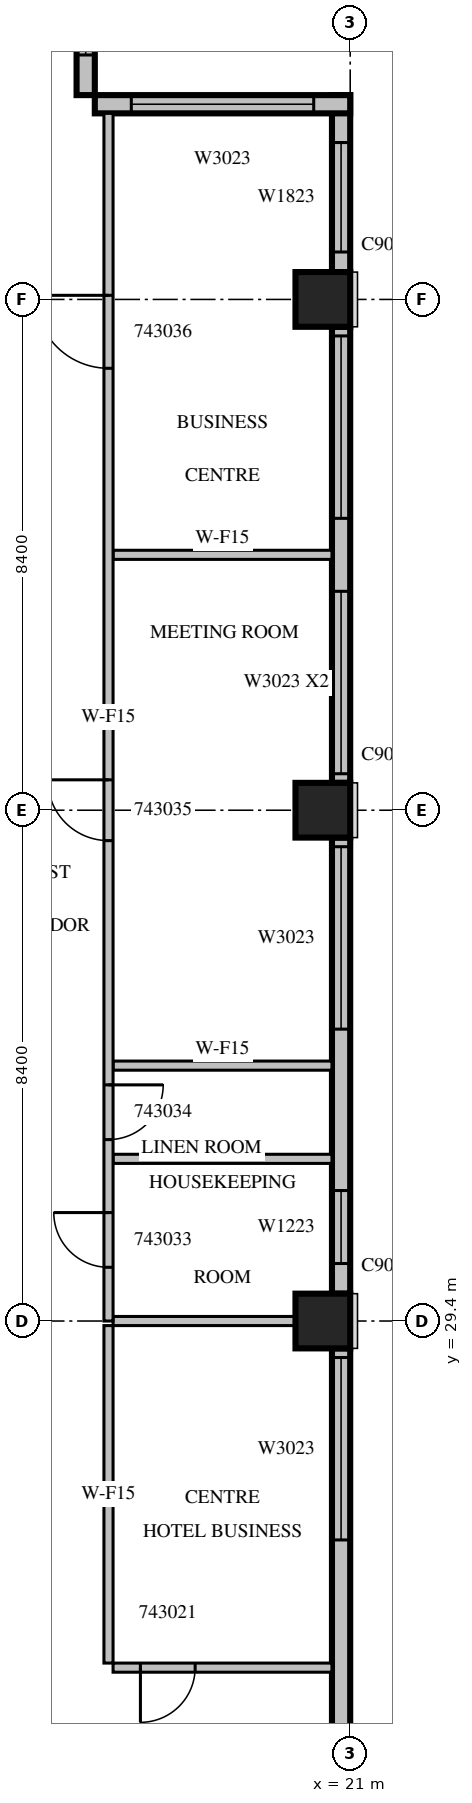
"""IFC4 building model, lengths in metres.
Left out: names, types, materials, properties, quantities, classifications, styles, units other than length and angle.
Written with IfcOpenShell. Run it as: python <this file> out.ifc"""

import sys

from ifc_helpers import new_model, si_unit, direction, frame, frame_2d, origin, origin_2d, place, context, subcontext, project, spatial, rectangle, extrude, source, transform, mapped, element, fill, save


model = new_model("IFC4")
c1 = context("Model", 3, precision=1e-05, world=origin(), true_north=direction((0.0, 1.0)))
c2 = subcontext(c1, "Body", "Model", "MODEL_VIEW")
j1 = project(units=[si_unit("LENGTHUNIT", "METRE"), si_unit("PLANEANGLEUNIT", "RADIAN")], contexts=[c1])
p1 = place(None, origin())
s1 = spatial("IfcSite", under=j1, at=p1, CompositionType="ELEMENT")
p2 = place(p1, origin())
s2 = spatial("IfcBuilding", under=s1, at=p2, CompositionType="ELEMENT")
p3 = place(p2, frame((0.0, 0.0, 196.8)))
s3 = spatial("IfcBuildingStorey", under=s2, at=p3, CompositionType="ELEMENT", Elevation=196.8)
m1 = source(origin(), c2, "Body", "SweptSolid", [
    extrude(rectangle(XDim=0.9, YDim=0.9, at=origin_2d()), origin(), (0.0, 0.0, 1.0), 3.8),
])
for number, where, z_axis, x_axis in (
    (1, (20.55, 29.4, 0.0), (0.0, 0.0, 1.0), (1.0, 0.0, 0.0)),
    (2, (20.55, 37.8, 0.0), (0.0, 0.0, 1.0), (1.0, 0.0, 0.0)),
    (3, (20.55, 46.2, 0.0), (0.0, 0.0, 1.0), (1.0, 0.0, 0.0)),
):
    element("IfcColumn", number, at=place(p3, frame(where, z_axis=z_axis, x_axis=x_axis)), inside=s3, PredefinedType="COLUMN", context=c2, shape_type="MappedRepresentation", body=[
        mapped(m1, transform((0.0, 0.0, 0.0), scale=1.0)),
    ])
m2 = source(origin(), c2, "Body", "SweptSolid", [
    extrude(rectangle(XDim=7.15, YDim=0.3, at=frame_2d((3.575, 0.0))), origin(), (0.0, 0.0, 1.0), 3.4),
])
p4 = place(p3, frame((20.85, 21.8, 0.0), z_axis=(0.0, 0.0, 1.0), x_axis=(0.0, 1.0, 0.0)))
e4 = element("IfcWall", 4, at=p4, inside=s3, PredefinedType="STANDARD", context=c2, shape_type="MappedRepresentation", body=[
    mapped(m2, transform((0.0, 0.0, 0.0), scale=1.0)),
])
m3 = source(origin(), c2, "Body", "SweptSolid", [
    extrude(rectangle(XDim=3.0, YDim=2.3, at=frame_2d((1.5, 1.15))), frame((0.0, 0.16, 0.0), z_axis=(0.0, -1.0, 0.0), x_axis=(1.0, 0.0, 0.0)), (0.0, 0.0, 1.0), 0.32),
])
p5 = place(p4, frame((4.0, 0.0, 0.6)))
e5 = element("IfcOpeningElement", 5, at=p5, cuts=e4, PredefinedType="OPENING", context=c2, shape_type="MappedRepresentation", body=[
    mapped(m3, transform((0.0, 0.0, 0.0), scale=1.0)),
])
m4 = source(origin(), c2, "Body", "SweptSolid", [
    extrude(rectangle(XDim=7.5, YDim=0.3, at=frame_2d((3.75, 0.0))), origin(), (0.0, 0.0, 1.0), 3.4),
])
p6 = place(p3, frame((20.85, 29.85, 0.0), z_axis=(0.0, 0.0, 1.0), x_axis=(0.0, 1.0, 0.0)))
e6 = element("IfcWall", 6, at=p6, inside=s3, PredefinedType="STANDARD", context=c2, shape_type="MappedRepresentation", body=[
    mapped(m4, transform((0.0, 0.0, 0.0), scale=1.0)),
])
m5 = source(origin(), c2, "Body", "SweptSolid", [
    extrude(rectangle(XDim=1.2, YDim=2.3, at=frame_2d((0.6, 1.15))), frame((0.0, 0.16, 0.0), z_axis=(0.0, -1.0, 0.0), x_axis=(1.0, 0.0, 0.0)), (0.0, 0.0, 1.0), 0.32),
])
p7 = place(p6, frame((0.496, 0.0, 0.6)))
e7 = element("IfcOpeningElement", 7, at=p7, cuts=e6, PredefinedType="OPENING", context=c2, shape_type="MappedRepresentation", body=[
    mapped(m5, transform((0.0, 0.0, 0.0), scale=1.0)),
])
p8 = place(p6, frame((4.35, 0.0, 0.6)))
e8 = element("IfcOpeningElement", 8, at=p8, cuts=e6, PredefinedType="OPENING", context=c2, shape_type="MappedRepresentation", body=[
    mapped(m3, transform((0.0, 0.0, 0.0), scale=1.0)),
])
p9 = place(p3, frame((20.85, 38.25, 0.0), z_axis=(0.0, 0.0, 1.0), x_axis=(0.0, 1.0, 0.0)))
e9 = element("IfcWall", 9, at=p9, inside=s3, PredefinedType="STANDARD", context=c2, shape_type="MappedRepresentation", body=[
    mapped(m4, transform((0.0, 0.0, 0.0), scale=1.0)),
])
p10 = place(p9, frame((0.15, 0.0, 0.6)))
e10 = element("IfcOpeningElement", 10, at=p10, cuts=e9, PredefinedType="OPENING", context=c2, shape_type="MappedRepresentation", body=[
    mapped(m3, transform((0.0, 0.0, 0.0), scale=1.0)),
])
p11 = place(p9, frame((4.35, 0.0, 0.6)))
e11 = element("IfcOpeningElement", 11, at=p11, cuts=e9, PredefinedType="OPENING", context=c2, shape_type="MappedRepresentation", body=[
    mapped(m3, transform((0.0, 0.0, 0.0), scale=1.0)),
])
m6 = source(origin(), c2, "Body", "SweptSolid", [
    extrude(rectangle(XDim=2.91, YDim=0.3, at=frame_2d((1.455, 0.0))), origin(), (0.0, 0.0, 1.0), 3.4),
])
p12 = place(p3, frame((20.85, 46.65, 0.0), z_axis=(0.0, 0.0, 1.0), x_axis=(0.0, 1.0, 0.0)))
e12 = element("IfcWall", 12, at=p12, inside=s3, PredefinedType="STANDARD", context=c2, shape_type="MappedRepresentation", body=[
    mapped(m6, transform((0.0, 0.0, 0.0), scale=1.0)),
])
m7 = source(origin(), c2, "Body", "SweptSolid", [
    extrude(rectangle(XDim=1.8, YDim=2.3, at=frame_2d((0.9, 1.15))), frame((0.0, 0.16, 0.0), z_axis=(0.0, -1.0, 0.0), x_axis=(1.0, 0.0, 0.0)), (0.0, 0.0, 1.0), 0.32),
])
p13 = place(p12, frame((0.33, 0.0, 0.6)))
e13 = element("IfcOpeningElement", 13, at=p13, cuts=e12, PredefinedType="OPENING", context=c2, shape_type="MappedRepresentation", body=[
    mapped(m7, transform((0.0, 0.0, 0.0), scale=1.0)),
])
m8 = source(origin(), c2, "Body", "SweptSolid", [
    extrude(rectangle(XDim=4.2, YDim=0.3, at=frame_2d((2.1, 0.0))), origin(), (0.0, 0.0, 1.0), 3.4),
])
p14 = place(p3, frame((21.0, 49.41, 0.0), z_axis=(0.0, 0.0, 1.0), x_axis=(-1.0, 0.0, 0.0)))
e14 = element("IfcWall", 14, at=p14, inside=s3, PredefinedType="STANDARD", context=c2, shape_type="MappedRepresentation", body=[
    mapped(m8, transform((0.0, 0.0, 0.0), scale=1.0)),
])
p15 = place(p14, frame((0.6, 0.0, 0.6)))
e15 = element("IfcOpeningElement", 15, at=p15, cuts=e14, PredefinedType="OPENING", context=c2, shape_type="MappedRepresentation", body=[
    mapped(m3, transform((0.0, 0.0, 0.0), scale=1.0)),
])
m9 = source(origin(), c2, "Body", "SweptSolid", [
    extrude(rectangle(XDim=2.52, YDim=0.3, at=frame_2d((1.26, 0.0))), origin(), (0.0, 0.0, 1.0), 3.4),
])
p16 = place(p3, frame((16.65, 49.56, 0.0), z_axis=(0.0, 0.0, 1.0), x_axis=(0.0, 1.0, 0.0)))
e16 = element("IfcWall", 16, at=p16, inside=s3, PredefinedType="STANDARD", context=c2, shape_type="MappedRepresentation", body=[
    mapped(m9, transform((0.0, 0.0, 0.0), scale=1.0)),
])
p17 = place(p16, frame((0.66, 0.0, 0.6)))
e17 = element("IfcOpeningElement", 17, at=p17, cuts=e16, PredefinedType="OPENING", context=c2, shape_type="MappedRepresentation", body=[
    mapped(m5, transform((0.0, 0.0, 0.0), scale=1.0)),
])
m10 = source(origin(), c2, "Body", "SweptSolid", [
    extrude(rectangle(XDim=3.6, YDim=0.15, at=frame_2d((1.8, 0.0))), origin(), (0.0, 0.0, 1.0), 3.4),
])
p18 = place(p3, frame((17.1, 23.7, 0.0), z_axis=(0.0, 0.0, 1.0), x_axis=(1.0, 0.0, 0.0)))
e18 = element("IfcWall", 18, at=p18, inside=s3, PredefinedType="PARTITIONING", context=c2, shape_type="MappedRepresentation", body=[
    mapped(m10, transform((0.0, 0.0, 0.0), scale=1.0)),
])
m11 = source(origin(), c2, "Body", "SweptSolid", [
    extrude(rectangle(XDim=0.9, YDim=2.1, at=frame_2d((0.45, 1.05))), frame((0.0, 0.085, 0.0), z_axis=(0.0, -1.0, 0.0), x_axis=(1.0, 0.0, 0.0)), (0.0, 0.0, 1.0), 0.17),
])
p19 = place(p18, frame((0.45, 0.0, 0.0)))
e19 = element("IfcOpeningElement", 19, at=p19, cuts=e18, PredefinedType="OPENING", context=c2, shape_type="MappedRepresentation", body=[
    mapped(m11, transform((0.0, 0.0, 0.0), scale=1.0)),
])
m12 = source(origin(), c2, "Body", "SweptSolid", [
    extrude(rectangle(XDim=5.55, YDim=0.15, at=frame_2d((2.775, 0.0))), origin(), (0.0, 0.0, 1.0), 3.4),
])
p20 = place(p3, frame((17.025, 29.325, 0.0), z_axis=(0.0, 0.0, 1.0), x_axis=(0.0, -1.0, 0.0)))
e20 = element("IfcWall", 20, at=p20, inside=s3, PredefinedType="PARTITIONING", context=c2, shape_type="MappedRepresentation", body=[
    mapped(m12, transform((0.0, 0.0, 0.0), scale=1.0)),
])
m13 = source(origin(), c2, "Body", "SweptSolid", [
    extrude(rectangle(XDim=3.001, YDim=0.15, at=frame_2d((1.5, 0.0))), origin(), (0.0, 0.0, 1.0), 3.4),
])
p21 = place(p3, frame((20.101, 29.4, 0.0), z_axis=(0.0, 0.0, 1.0), x_axis=(-1.0, 0.0, 0.0)))
e21 = element("IfcWall", 21, at=p21, inside=s3, PredefinedType="PARTITIONING", context=c2, shape_type="MappedRepresentation", body=[
    mapped(m13, transform((0.0, 0.0, 0.0), scale=1.0)),
])
for number, where, z_axis, x_axis in (
    (22, (17.1, 32.067, 0.0), (0.0, 0.0, 1.0), (1.0, 0.0, 0.0)),
    (23, (20.7, 33.6, 0.0), (0.0, 0.0, 1.0), (-1.0, 0.0, 0.0)),
    (24, (20.7, 42.0, 0.0), (0.0, 0.0, 1.0), (-1.0, 0.0, 0.0)),
):
    element("IfcWall", number, at=place(p3, frame(where, z_axis=z_axis, x_axis=x_axis)), inside=s3, PredefinedType="PARTITIONING", context=c2, shape_type="MappedRepresentation", body=[
        mapped(m10, transform((0.0, 0.0, 0.0), scale=1.0)),
    ])
m14 = source(origin(), c2, "Body", "SweptSolid", [
    extrude(rectangle(XDim=19.86, YDim=0.15, at=frame_2d((9.93, 0.0))), origin(), (0.0, 0.0, 1.0), 3.4),
])
p22 = place(p3, frame((17.025, 49.26, 0.0), z_axis=(0.0, 0.0, 1.0), x_axis=(0.0, -1.0, 0.0)))
e25 = element("IfcWall", 25, at=p22, inside=s3, PredefinedType="PARTITIONING", context=c2, shape_type="MappedRepresentation", body=[
    mapped(m14, transform((0.0, 0.0, 0.0), scale=1.0)),
])
p23 = place(p22, frame((18.076, 0.0, 0.0)))
e26 = element("IfcOpeningElement", 26, at=p23, cuts=e25, PredefinedType="OPENING", context=c2, shape_type="MappedRepresentation", body=[
    mapped(m11, transform((0.0, 0.0, 0.0), scale=1.0)),
])
p24 = place(p22, frame((15.976, 0.0, 0.0)))
e27 = element("IfcOpeningElement", 27, at=p24, cuts=e25, PredefinedType="OPENING", context=c2, shape_type="MappedRepresentation", body=[
    mapped(m11, transform((0.0, 0.0, 0.0), scale=1.0)),
])
m15 = source(origin(), c2, "Body", "SweptSolid", [
    extrude(rectangle(XDim=1.0, YDim=2.1, at=frame_2d((0.5, 1.05))), frame((0.0, 0.085, 0.0), z_axis=(0.0, -1.0, 0.0), x_axis=(1.0, 0.0, 0.0)), (0.0, 0.0, 1.0), 0.17),
])
p25 = place(p22, frame((10.96, 0.0, 0.0)))
e28 = element("IfcOpeningElement", 28, at=p25, cuts=e25, PredefinedType="OPENING", context=c2, shape_type="MappedRepresentation", body=[
    mapped(m15, transform((0.0, 0.0, 0.0), scale=1.0)),
])
m16 = source(origin(), c2, "Body", "SweptSolid", [
    extrude(rectangle(XDim=1.2, YDim=2.1, at=frame_2d((0.6, 1.05))), frame((0.0, 0.085, 0.0), z_axis=(0.0, -1.0, 0.0), x_axis=(1.0, 0.0, 0.0)), (0.0, 0.0, 1.0), 0.17),
])
p26 = place(p22, frame((2.993, 0.0, 0.0)))
e29 = element("IfcOpeningElement", 29, at=p26, cuts=e25, PredefinedType="OPENING", context=c2, shape_type="MappedRepresentation", body=[
    mapped(m16, transform((0.0, 0.0, 0.0), scale=1.0)),
])
m17 = source(origin(), c2, "Body", "SweptSolid", [
    extrude(rectangle(XDim=3.0, YDim=2.3, at=frame_2d((1.5, 1.15))), frame((0.0, 0.03, 0.0), z_axis=(0.0, -1.0, 0.0), x_axis=(1.0, 0.0, 0.0)), (0.0, 0.0, 1.0), 0.06),
])
p27 = place(p5, origin())
e30 = element("IfcWindow", 30, at=p27, inside=s3, PartitioningType="SINGLE_PANEL", PredefinedType="WINDOW", context=c2, shape_type="MappedRepresentation", body=[
    mapped(m17, transform((0.0, 0.0, 0.0), scale=1.0)),
])
fill(e5, e30)
m18 = source(origin(), c2, "Body", "SweptSolid", [
    extrude(rectangle(XDim=1.2, YDim=2.3, at=frame_2d((0.6, 1.15))), frame((0.0, 0.03, 0.0), z_axis=(0.0, -1.0, 0.0), x_axis=(1.0, 0.0, 0.0)), (0.0, 0.0, 1.0), 0.06),
])
p28 = place(p7, origin())
e31 = element("IfcWindow", 31, at=p28, inside=s3, PartitioningType="SINGLE_PANEL", PredefinedType="WINDOW", context=c2, shape_type="MappedRepresentation", body=[
    mapped(m18, transform((0.0, 0.0, 0.0), scale=1.0)),
])
fill(e7, e31)
p29 = place(p8, origin())
e32 = element("IfcWindow", 32, at=p29, inside=s3, PartitioningType="SINGLE_PANEL", PredefinedType="WINDOW", context=c2, shape_type="MappedRepresentation", body=[
    mapped(m17, transform((0.0, 0.0, 0.0), scale=1.0)),
])
fill(e8, e32)
p30 = place(p10, origin())
e33 = element("IfcWindow", 33, at=p30, inside=s3, PartitioningType="SINGLE_PANEL", PredefinedType="WINDOW", context=c2, shape_type="MappedRepresentation", body=[
    mapped(m17, transform((0.0, 0.0, 0.0), scale=1.0)),
])
fill(e10, e33)
p31 = place(p11, origin())
e34 = element("IfcWindow", 34, at=p31, inside=s3, PartitioningType="SINGLE_PANEL", PredefinedType="WINDOW", context=c2, shape_type="MappedRepresentation", body=[
    mapped(m17, transform((0.0, 0.0, 0.0), scale=1.0)),
])
fill(e11, e34)
m19 = source(origin(), c2, "Body", "SweptSolid", [
    extrude(rectangle(XDim=1.8, YDim=2.3, at=frame_2d((0.9, 1.15))), frame((0.0, 0.03, 0.0), z_axis=(0.0, -1.0, 0.0), x_axis=(1.0, 0.0, 0.0)), (0.0, 0.0, 1.0), 0.06),
])
p32 = place(p13, origin())
e35 = element("IfcWindow", 35, at=p32, inside=s3, PartitioningType="SINGLE_PANEL", PredefinedType="WINDOW", context=c2, shape_type="MappedRepresentation", body=[
    mapped(m19, transform((0.0, 0.0, 0.0), scale=1.0)),
])
fill(e13, e35)
p33 = place(p15, origin())
e36 = element("IfcWindow", 36, at=p33, inside=s3, PartitioningType="SINGLE_PANEL", PredefinedType="WINDOW", context=c2, shape_type="MappedRepresentation", body=[
    mapped(m17, transform((0.0, 0.0, 0.0), scale=1.0)),
])
fill(e15, e36)
p34 = place(p17, origin())
e37 = element("IfcWindow", 37, at=p34, inside=s3, PartitioningType="SINGLE_PANEL", PredefinedType="WINDOW", context=c2, shape_type="MappedRepresentation", body=[
    mapped(m18, transform((0.0, 0.0, 0.0), scale=1.0)),
])
fill(e17, e37)
m20 = source(origin(), c2, "Body", "SweptSolid", [
    extrude(rectangle(XDim=0.9, YDim=2.1, at=frame_2d((0.45, 1.05))), frame((0.0, 0.025, 0.0), z_axis=(0.0, -1.0, 0.0), x_axis=(1.0, 0.0, 0.0)), (0.0, 0.0, 1.0), 0.05),
])
p35 = place(p19, origin())
e38 = element("IfcDoor", 38, at=p35, inside=s3, OperationType="SINGLE_SWING_RIGHT", PredefinedType="DOOR", context=c2, shape_type="MappedRepresentation", body=[
    mapped(m20, transform((0.0, 0.0, 0.0), scale=1.0)),
])
fill(e19, e38)
p36 = place(p23, origin())
e39 = element("IfcDoor", 39, at=p36, inside=s3, OperationType="SINGLE_SWING_RIGHT", PredefinedType="DOOR", context=c2, shape_type="MappedRepresentation", body=[
    mapped(m20, transform((0.0, 0.0, 0.0), scale=1.0)),
])
fill(e26, e39)
p37 = place(p24, origin())
e40 = element("IfcDoor", 40, at=p37, inside=s3, OperationType="SINGLE_SWING_LEFT", PredefinedType="DOOR", context=c2, shape_type="MappedRepresentation", body=[
    mapped(m20, transform((0.0, 0.0, 0.0), scale=1.0)),
])
fill(e27, e40)
m21 = source(origin(), c2, "Body", "SweptSolid", [
    extrude(rectangle(XDim=1.0, YDim=2.1, at=frame_2d((0.5, 1.05))), frame((0.0, 0.025, 0.0), z_axis=(0.0, -1.0, 0.0), x_axis=(1.0, 0.0, 0.0)), (0.0, 0.0, 1.0), 0.05),
])
p38 = place(p25, origin())
e41 = element("IfcDoor", 41, at=p38, inside=s3, OperationType="SINGLE_SWING_RIGHT", PredefinedType="DOOR", context=c2, shape_type="MappedRepresentation", body=[
    mapped(m21, transform((0.0, 0.0, 0.0), scale=1.0)),
])
fill(e28, e41)
m22 = source(origin(), c2, "Body", "SweptSolid", [
    extrude(rectangle(XDim=1.2, YDim=2.1, at=frame_2d((0.6, 1.05))), frame((0.0, 0.025, 0.0), z_axis=(0.0, -1.0, 0.0), x_axis=(1.0, 0.0, 0.0)), (0.0, 0.0, 1.0), 0.05),
])
p39 = place(p26, origin())
e42 = element("IfcDoor", 42, at=p39, inside=s3, OperationType="SINGLE_SWING_RIGHT", PredefinedType="DOOR", context=c2, shape_type="MappedRepresentation", body=[
    mapped(m22, transform((0.0, 0.0, 0.0), scale=1.0)),
])
fill(e29, e42)
save(model, sys.argv[1])
